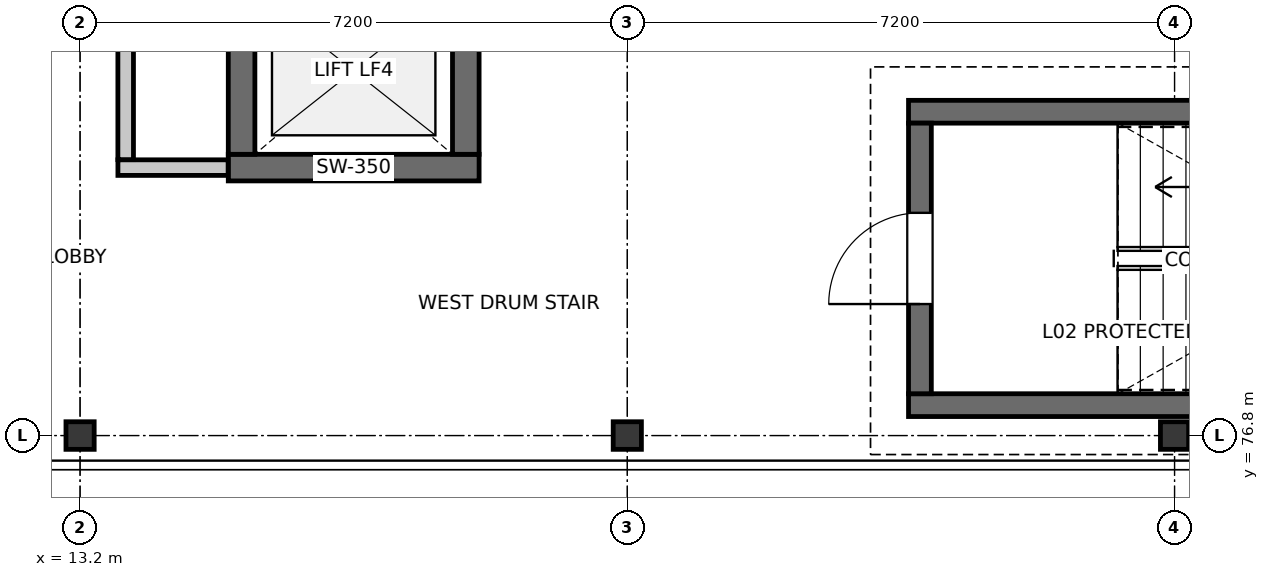
"""IFC4 building model, lengths in metres.
Left out: names, types, materials, properties, quantities, classifications, styles, units other than length and angle.
Written with IfcOpenShell. Run it as: python <this file> out.ifc"""

import sys

from ifc_helpers import new_model, si_unit, direction, frame, frame_2d, origin, origin_2d, place, context, subcontext, project, spatial, rectangle, i_section, extrude, element, fill, save


model = new_model("IFC4")
c1 = context("Model", 3, precision=1e-05, world=origin(), true_north=direction((0.0, 1.0)))
c2 = subcontext(c1, "Body", "Model", "MODEL_VIEW")
j1 = project(units=[si_unit("LENGTHUNIT", "METRE"), si_unit("PLANEANGLEUNIT", "RADIAN")], contexts=[c1])
p1 = place(None, origin())
s1 = spatial("IfcSite", under=j1, at=p1, CompositionType="ELEMENT")
p2 = place(p1, origin())
s2 = spatial("IfcBuilding", under=s1, at=p2, CompositionType="ELEMENT")
p3 = place(p2, frame((0.0, 0.0, 9.3)))
s3 = spatial("IfcBuildingStorey", under=s2, at=p3, CompositionType="ELEMENT", Elevation=9.3)
for number, where, z_axis, x_axis in (
    (1, (13.2, 76.8, 0.0), (0.0, 0.0, 1.0), (1.0, 0.0, 0.0)),
    (2, (20.4, 76.8, 0.0), (0.0, 0.0, 1.0), (1.0, 0.0, 0.0)),
    (3, (27.6, 76.8, 0.0), (0.0, 0.0, 1.0), (1.0, 0.0, 0.0)),
):
    element("IfcColumn", number, at=place(p3, frame(where, z_axis=z_axis, x_axis=x_axis)), inside=s3, PredefinedType="COLUMN", context=c2, shape_type="SweptSolid", body=[
        extrude(i_section(OverallWidth=0.371, OverallDepth=0.363, WebThickness=0.013, FlangeThickness=0.022, FilletRadius=0.015, at=origin_2d()), origin(), (0.0, 0.0, 1.0), 3.9),
    ])
for number, where, z_axis, x_axis in (
    (4, (33.5, 77.2, 0.0), (0.0, 0.0, 1.0), (-1.0, 0.0, 0.0)),
    (5, (24.1, 81.06, 0.0), (0.0, 0.0, 1.0), (1.0, 0.0, 0.0)),
):
    element("IfcWall", number, at=place(p3, frame(where, z_axis=z_axis, x_axis=x_axis)), inside=s3, PredefinedType="SOLIDWALL", context=c2, shape_type="SweptSolid", body=[
        extrude(rectangle(XDim=9.4, YDim=0.3, at=frame_2d((4.7, 0.0))), origin(), (0.0, 0.0, 1.0), 3.65),
    ])
p4 = place(p3, frame((24.25, 77.35, 0.0), z_axis=(0.0, 0.0, 1.0), x_axis=(0.0, 1.0, 0.0)))
e6 = element("IfcWall", 6, at=p4, inside=s3, PredefinedType="SOLIDWALL", context=c2, shape_type="SweptSolid", body=[
    extrude(rectangle(XDim=3.56, YDim=0.3, at=frame_2d((1.78, 0.0))), origin(), (0.0, 0.0, 1.0), 3.65),
])
p5 = place(p4, frame((1.18, 0.0, 0.0)))
e7 = element("IfcOpeningElement", 7, at=p5, cuts=e6, PredefinedType="OPENING", context=c2, shape_type="SweptSolid", body=[
    extrude(rectangle(XDim=1.2, YDim=2.2, at=frame_2d((0.6, 1.1))), frame((0.0, 0.16, 0.0), z_axis=(0.0, -1.0, 0.0), x_axis=(1.0, 0.0, 0.0)), (0.0, 0.0, 1.0), 0.32),
])
p6 = place(p3, frame((18.45, 80.325, 0.0), z_axis=(0.0, 0.0, 1.0), x_axis=(-1.0, 0.0, 0.0)))
e8 = element("IfcWall", 8, at=p6, inside=s3, PredefinedType="SHEAR", context=c2, shape_type="SweptSolid", body=[
    extrude(rectangle(XDim=3.3, YDim=0.35, at=frame_2d((1.65, 0.0))), origin(), (0.0, 0.0, 1.0), 3.65),
])
for number, where, z_axis, x_axis in (
    (9, (15.325, 80.5, 0.0), (0.0, 0.0, 1.0), (0.0, 1.0, 0.0)),
    (10, (18.275, 82.7, 0.0), (0.0, 0.0, 1.0), (0.0, -1.0, 0.0)),
):
    element("IfcWall", number, at=place(p3, frame(where, z_axis=z_axis, x_axis=x_axis)), inside=s3, PredefinedType="SHEAR", context=c2, shape_type="SweptSolid", body=[
        extrude(rectangle(XDim=2.2, YDim=0.35, at=frame_2d((1.1, 0.0))), origin(), (0.0, 0.0, 1.0), 3.65),
    ])
p7 = place(p3, frame((15.148, 80.325, 0.0), z_axis=(0.0, 0.0, 1.0), x_axis=(-1.0, 0.0, 0.0)))
e11 = element("IfcWall", 11, at=p7, inside=s3, PredefinedType="PARTITIONING", context=c2, shape_type="SweptSolid", body=[
    extrude(rectangle(XDim=1.45, YDim=0.205, at=frame_2d((0.725, 0.0))), origin(), (0.0, 0.0, 1.0), 3.018),
])
p8 = place(p3, frame((13.8, 80.43, 0.0), z_axis=(0.0, 0.0, 1.0), x_axis=(0.0, 1.0, 0.0)))
e12 = element("IfcWall", 12, at=p8, inside=s3, PredefinedType="PARTITIONING", context=c2, shape_type="SweptSolid", body=[
    extrude(rectangle(XDim=4.516, YDim=0.205, at=frame_2d((2.258, 0.0))), origin(), (0.0, 0.0, 1.0), 3.018),
])
p9 = place(p8, frame((1.788, 0.0, 0.0)))
e13 = element("IfcOpeningElement", 13, at=p9, cuts=e12, PredefinedType="OPENING", context=c2, shape_type="SweptSolid", body=[
    extrude(rectangle(XDim=0.94, YDim=2.1, at=frame_2d((0.47, 1.05))), frame((0.0, 0.113, 0.0), z_axis=(0.0, -1.0, 0.0), x_axis=(1.0, 0.0, 0.0)), (0.0, 0.0, 1.0), 0.225),
])
p10 = place(p5, origin())
e14 = element("IfcDoor", 14, at=p10, inside=s3, OperationType="SINGLE_SWING_LEFT", PredefinedType="DOOR", context=c2, shape_type="SweptSolid", body=[
    extrude(rectangle(XDim=1.2, YDim=2.2, at=frame_2d((0.6, 1.1))), frame((0.0, 0.025, 0.0), z_axis=(0.0, -1.0, 0.0), x_axis=(1.0, 0.0, 0.0)), (0.0, 0.0, 1.0), 0.05),
])
fill(e7, e14)
save(model, sys.argv[1])
